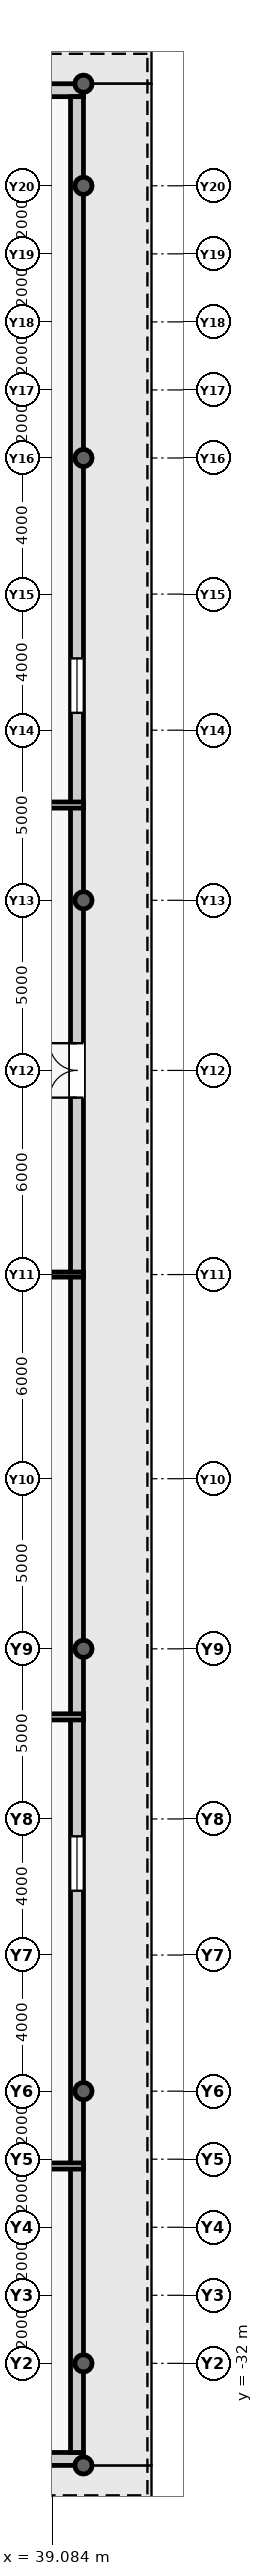
"""IFC4 building model, lengths in metres.
Left out: names, types, materials, properties, quantities, classifications, styles, units other than length and angle.
Written with IfcOpenShell. Run it as: python <this file> out.ifc"""

import sys

from ifc_helpers import new_model, si_unit, direction, frame, frame_2d, origin, origin_2d, place, context, subcontext, project, spatial, rectangle, hollow_circle, extrude, source, transform, mapped, element, fill, save


model = new_model("IFC4")
c1 = context("Model", 3, precision=1e-05, world=origin(), true_north=direction((0.0, 1.0)))
c2 = subcontext(c1, "Body", "Model", "MODEL_VIEW")
j1 = project(units=[si_unit("LENGTHUNIT", "METRE"), si_unit("PLANEANGLEUNIT", "RADIAN")], contexts=[c1])
p1 = place(None, origin())
s1 = spatial("IfcSite", under=j1, at=p1, CompositionType="ELEMENT")
p2 = place(p1, origin())
s2 = spatial("IfcBuilding", under=s1, at=p2, CompositionType="ELEMENT")
p3 = place(p2, frame((0.0, 0.0, 17.4)))
s3 = spatial("IfcBuildingStorey", under=s2, at=p3, CompositionType="ELEMENT", Elevation=17.4)
m1 = source(origin(), c2, "Body", "SweptSolid", [
    extrude(hollow_circle(Radius=0.254, WallThickness=0.025, at=origin_2d()), origin(), (0.0, 0.0, 1.0), 4.8),
])
for number, where, z_axis, x_axis in (
    (1, (40.0, -35.0, 0.0), (0.0, 0.0, 1.0), (1.0, 0.0, 0.0)),
    (2, (40.0, -24.0, 0.0), (0.0, 0.0, 1.0), (1.0, 0.0, 0.0)),
    (3, (40.0, -11.0, 0.0), (0.0, 0.0, 1.0), (1.0, 0.0, 0.0)),
    (4, (40.0, 11.0, 0.0), (0.0, 0.0, 1.0), (1.0, 0.0, 0.0)),
    (5, (40.0, 24.0, 0.0), (0.0, 0.0, 1.0), (1.0, 0.0, 0.0)),
    (6, (40.0, 35.0, 0.0), (0.0, 0.0, 1.0), (1.0, 0.0, 0.0)),
    (7, (40.0, -32.0, 0.0), (0.0, 0.0, 1.0), (1.0, 0.0, 0.0)),
    (8, (40.0, 32.0, 0.0), (0.0, 0.0, 1.0), (1.0, 0.0, 0.0)),
):
    element("IfcColumn", number, at=place(p3, frame(where, z_axis=z_axis, x_axis=x_axis)), inside=s3, PredefinedType="COLUMN", context=c2, shape_type="MappedRepresentation", body=[
        mapped(m1, transform((0.0, 0.0, 0.0), scale=1.0)),
    ])
m2 = source(origin(), c2, "Body", "SweptSolid", [
    extrude(rectangle(XDim=30.0, YDim=0.38, at=frame_2d((15.0, 0.0))), origin(), (0.0, 0.0, 1.0), 2.68),
])
p4 = place(p3, frame((10.0, -34.81, 0.0), z_axis=(0.0, 0.0, 1.0), x_axis=(1.0, 0.0, 0.0)))
e9 = element("IfcWall", 9, at=p4, inside=s3, PredefinedType="STANDARD", context=c2, shape_type="MappedRepresentation", body=[
    mapped(m2, transform((0.0, 0.0, 0.0), scale=1.0)),
])
m3 = source(origin(), c2, "Body", "SweptSolid", [
    extrude(rectangle(XDim=1.6, YDim=1.96, at=frame_2d((0.8, 0.98))), frame((0.0, 0.2, 0.0), z_axis=(0.0, -1.0, 0.0), x_axis=(1.0, 0.0, 0.0)), (0.0, 0.0, 1.0), 0.4),
])
p5 = place(p4, frame((6.7, 0.0, 0.5)))
e10 = element("IfcOpeningElement", 10, at=p5, cuts=e9, PredefinedType="OPENING", context=c2, shape_type="MappedRepresentation", body=[
    mapped(m3, transform((0.0, 0.0, 0.0), scale=1.0)),
])
p6 = place(p4, frame((14.2, 0.0, 0.5)))
e11 = element("IfcOpeningElement", 11, at=p6, cuts=e9, PredefinedType="OPENING", context=c2, shape_type="MappedRepresentation", body=[
    mapped(m3, transform((0.0, 0.0, 0.0), scale=1.0)),
])
p7 = place(p3, frame((10.0, 34.81, 0.0), z_axis=(0.0, 0.0, 1.0), x_axis=(1.0, 0.0, 0.0)))
e12 = element("IfcWall", 12, at=p7, inside=s3, PredefinedType="STANDARD", context=c2, shape_type="MappedRepresentation", body=[
    mapped(m2, transform((0.0, 0.0, 0.0), scale=1.0)),
])
p8 = place(p7, frame((6.7, 0.0, 0.5)))
e13 = element("IfcOpeningElement", 13, at=p8, cuts=e12, PredefinedType="OPENING", context=c2, shape_type="MappedRepresentation", body=[
    mapped(m3, transform((0.0, 0.0, 0.0), scale=1.0)),
])
p9 = place(p7, frame((14.2, 0.0, 0.5)))
e14 = element("IfcOpeningElement", 14, at=p9, cuts=e12, PredefinedType="OPENING", context=c2, shape_type="MappedRepresentation", body=[
    mapped(m3, transform((0.0, 0.0, 0.0), scale=1.0)),
])
m4 = source(origin(), c2, "Body", "SweptSolid", [
    extrude(rectangle(XDim=69.24, YDim=0.38, at=frame_2d((34.62, 0.0))), origin(), (0.0, 0.0, 1.0), 2.68),
])
p10 = place(p3, frame((39.81, -34.62, 0.0), z_axis=(0.0, 0.0, 1.0), x_axis=(0.0, 1.0, 0.0)))
e15 = element("IfcWall", 15, at=p10, inside=s3, PredefinedType="STANDARD", context=c2, shape_type="MappedRepresentation", body=[
    mapped(m4, transform((0.0, 0.0, 0.0), scale=1.0)),
])
m5 = source(origin(), c2, "Body", "SweptSolid", [
    extrude(rectangle(XDim=1.6, YDim=2.25, at=frame_2d((0.8, 1.125))), frame((0.0, 0.2, 0.0), z_axis=(0.0, -1.0, 0.0), x_axis=(1.0, 0.0, 0.0)), (0.0, 0.0, 1.0), 0.4),
])
p11 = place(p10, frame((39.82, 0.0, 0.0)))
e16 = element("IfcOpeningElement", 16, at=p11, cuts=e15, PredefinedType="OPENING", context=c2, shape_type="MappedRepresentation", body=[
    mapped(m5, transform((0.0, 0.0, 0.0), scale=1.0)),
])
p12 = place(p10, frame((16.51, 0.0, 0.5)))
e17 = element("IfcOpeningElement", 17, at=p12, cuts=e15, PredefinedType="OPENING", context=c2, shape_type="MappedRepresentation", body=[
    mapped(m3, transform((0.0, 0.0, 0.0), scale=1.0)),
])
p13 = place(p10, frame((51.13, 0.0, 0.5)))
e18 = element("IfcOpeningElement", 18, at=p13, cuts=e15, PredefinedType="OPENING", context=c2, shape_type="MappedRepresentation", body=[
    mapped(m3, transform((0.0, 0.0, 0.0), scale=1.0)),
])
m6 = source(origin(), c2, "Body", "SweptSolid", [
    extrude(rectangle(XDim=80.0, YDim=0.18, at=frame_2d((40.0, 0.0))), origin(), (0.0, 0.0, 1.0), 4.48),
])
p14 = place(p3, frame((-40.0, -26.2, 0.0), z_axis=(0.0, 0.0, 1.0), x_axis=(1.0, 0.0, 0.0)))
e19 = element("IfcWall", 19, at=p14, inside=s3, PredefinedType="PARTITIONING", context=c2, shape_type="MappedRepresentation", body=[
    mapped(m6, transform((0.0, 0.0, 0.0), scale=1.0)),
])
m7 = source(origin(), c2, "Body", "SweptSolid", [
    extrude(rectangle(XDim=1.05, YDim=2.2, at=frame_2d((0.525, 1.1))), frame((0.0, 0.1, 0.0), z_axis=(0.0, -1.0, 0.0), x_axis=(1.0, 0.0, 0.0)), (0.0, 0.0, 1.0), 0.2),
])
p15 = place(p14, frame((17.725, 0.0, 0.0)))
e20 = element("IfcOpeningElement", 20, at=p15, cuts=e19, PredefinedType="OPENING", context=c2, shape_type="MappedRepresentation", body=[
    mapped(m7, transform((0.0, 0.0, 0.0), scale=1.0)),
])
p16 = place(p14, frame((36.475, 0.0, 0.0)))
e21 = element("IfcOpeningElement", 21, at=p16, cuts=e19, PredefinedType="OPENING", context=c2, shape_type="MappedRepresentation", body=[
    mapped(m7, transform((0.0, 0.0, 0.0), scale=1.0)),
])
p17 = place(p14, frame((58.225, 0.0, 0.0)))
e22 = element("IfcOpeningElement", 22, at=p17, cuts=e19, PredefinedType="OPENING", context=c2, shape_type="MappedRepresentation", body=[
    mapped(m7, transform((0.0, 0.0, 0.0), scale=1.0)),
])
p18 = place(p3, frame((-40.0, 13.8, 0.0), z_axis=(0.0, 0.0, 1.0), x_axis=(1.0, 0.0, 0.0)))
e23 = element("IfcWall", 23, at=p18, inside=s3, PredefinedType="PARTITIONING", context=c2, shape_type="MappedRepresentation", body=[
    mapped(m6, transform((0.0, 0.0, 0.0), scale=1.0)),
])
p19 = place(p18, frame((21.725, 0.0, 0.0)))
e24 = element("IfcOpeningElement", 24, at=p19, cuts=e23, PredefinedType="OPENING", context=c2, shape_type="MappedRepresentation", body=[
    mapped(m7, transform((0.0, 0.0, 0.0), scale=1.0)),
])
p20 = place(p18, frame((44.475, 0.0, 0.0)))
e25 = element("IfcOpeningElement", 25, at=p20, cuts=e23, PredefinedType="OPENING", context=c2, shape_type="MappedRepresentation", body=[
    mapped(m7, transform((0.0, 0.0, 0.0), scale=1.0)),
])
p21 = place(p18, frame((62.225, 0.0, 0.0)))
e26 = element("IfcOpeningElement", 26, at=p21, cuts=e23, PredefinedType="OPENING", context=c2, shape_type="MappedRepresentation", body=[
    mapped(m7, transform((0.0, 0.0, 0.0), scale=1.0)),
])
m8 = source(origin(), c2, "Body", "SweptSolid", [
    extrude(rectangle(XDim=21.8, YDim=0.18, at=frame_2d((10.9, 0.0))), origin(), (0.0, 0.0, 1.0), 4.48),
])
p22 = place(p3, frame((18.2, -13.0, 0.0), z_axis=(0.0, 0.0, 1.0), x_axis=(1.0, 0.0, 0.0)))
e27 = element("IfcWall", 27, at=p22, inside=s3, PredefinedType="PARTITIONING", context=c2, shape_type="MappedRepresentation", body=[
    mapped(m8, transform((0.0, 0.0, 0.0), scale=1.0)),
])
m9 = source(origin(), c2, "Body", "SweptSolid", [
    extrude(rectangle(XDim=21.8, YDim=0.15, at=frame_2d((10.9, 0.0))), origin(), (0.0, 0.0, 1.0), 2.68),
])
p23 = place(p3, frame((18.2, 0.0, 0.0), z_axis=(0.0, 0.0, 1.0), x_axis=(1.0, 0.0, 0.0)))
e28 = element("IfcWall", 28, at=p23, inside=s3, PredefinedType="PARTITIONING", context=c2, shape_type="MappedRepresentation", body=[
    mapped(m9, transform((0.0, 0.0, 0.0), scale=1.0)),
])
m10 = source(origin(), c2, "Body", "SweptSolid", [
    extrude(rectangle(XDim=1.6, YDim=2.25, at=frame_2d((0.8, 1.125))), frame((0.0, 0.025, 0.0), z_axis=(0.0, -1.0, 0.0), x_axis=(1.0, 0.0, 0.0)), (0.0, 0.0, 1.0), 0.05),
])
p24 = place(p11, origin())
e29 = element("IfcDoor", 29, at=p24, inside=s3, OperationType="DOUBLE_DOOR_SINGLE_SWING", PredefinedType="DOOR", context=c2, shape_type="MappedRepresentation", body=[
    mapped(m10, transform((0.0, 0.0, 0.0), scale=1.0)),
])
fill(e16, e29)
m11 = source(origin(), c2, "Body", "SweptSolid", [
    extrude(rectangle(XDim=1.6, YDim=1.96, at=frame_2d((0.8, 0.98))), frame((0.0, 0.03, 0.0), z_axis=(0.0, -1.0, 0.0), x_axis=(1.0, 0.0, 0.0)), (0.0, 0.0, 1.0), 0.06),
])
p25 = place(p12, origin())
e30 = element("IfcWindow", 30, at=p25, inside=s3, PartitioningType="SINGLE_PANEL", PredefinedType="WINDOW", context=c2, shape_type="MappedRepresentation", body=[
    mapped(m11, transform((0.0, 0.0, 0.0), scale=1.0)),
])
fill(e17, e30)
p26 = place(p13, origin())
e31 = element("IfcWindow", 31, at=p26, inside=s3, PartitioningType="SINGLE_PANEL", PredefinedType="WINDOW", context=c2, shape_type="MappedRepresentation", body=[
    mapped(m11, transform((0.0, 0.0, 0.0), scale=1.0)),
])
fill(e18, e31)
save(model, sys.argv[1])
